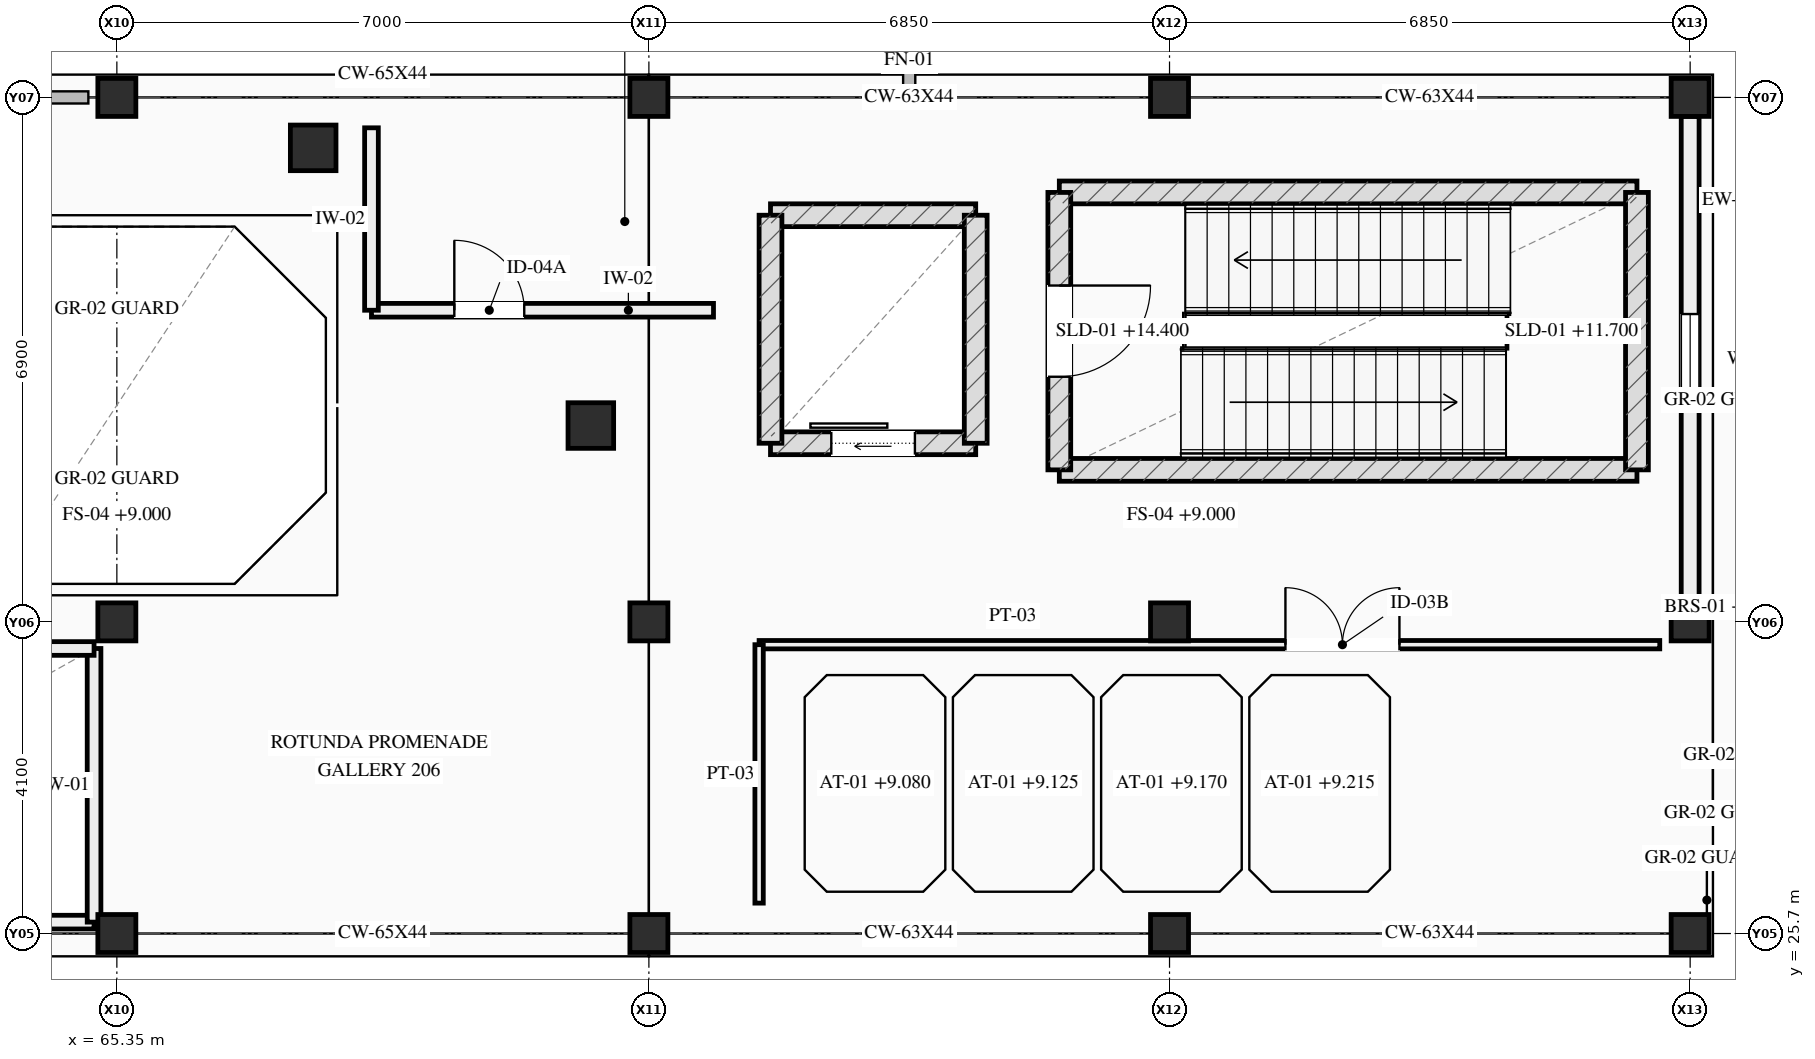
"""IFC4 building model, lengths in metres.
Left out: names, types, materials, properties, quantities, classifications, styles, units other than length and angle.
Written with IfcOpenShell. Run it as: python <this file> out.ifc"""

import sys

from ifc_helpers import new_model, si_unit, direction, frame, frame_2d, origin, origin_2d, place, context, subcontext, project, spatial, rectangle, circle, extrude, element, fill, save


model = new_model("IFC4")
c1 = context("Model", 3, precision=1e-05, world=origin(), true_north=direction((0.0, 1.0)))
c2 = subcontext(c1, "Body", "Model", "MODEL_VIEW")
j1 = project(units=[si_unit("LENGTHUNIT", "METRE"), si_unit("PLANEANGLEUNIT", "RADIAN")], contexts=[c1])
p1 = place(None, origin())
s1 = spatial("IfcSite", under=j1, at=p1, CompositionType="ELEMENT")
p2 = place(p1, origin())
s2 = spatial("IfcBuilding", under=s1, at=p2, CompositionType="ELEMENT")
p3 = place(p2, frame((0.0, 0.0, 9.0)))
s3 = spatial("IfcBuildingStorey", under=s2, at=p3, CompositionType="ELEMENT", Elevation=9.0)
for number, where, z_axis, x_axis in (
    (1, (65.35, 25.7, 0.0), (0.0, 0.0, 1.0), (1.0, 0.0, 0.0)),
    (2, (65.35, 29.8, 0.0), (0.0, 0.0, 1.0), (1.0, 0.0, 0.0)),
    (3, (65.35, 36.7, 0.0), (0.0, 0.0, 1.0), (1.0, 0.0, 0.0)),
    (4, (72.35, 25.7, 0.0), (0.0, 0.0, 1.0), (1.0, 0.0, 0.0)),
    (5, (72.35, 29.8, 0.0), (0.0, 0.0, 1.0), (1.0, 0.0, 0.0)),
    (6, (72.35, 36.7, 0.0), (0.0, 0.0, 1.0), (1.0, 0.0, 0.0)),
    (7, (79.2, 25.7, 0.0), (0.0, 0.0, 1.0), (1.0, 0.0, 0.0)),
    (8, (79.2, 29.8, 0.0), (0.0, 0.0, 1.0), (1.0, 0.0, 0.0)),
    (9, (79.2, 36.7, 0.0), (0.0, 0.0, 1.0), (1.0, 0.0, 0.0)),
    (10, (86.05, 25.7, 0.0), (0.0, 0.0, 1.0), (1.0, 0.0, 0.0)),
    (11, (86.05, 29.8, 0.0), (0.0, 0.0, 1.0), (1.0, 0.0, 0.0)),
    (12, (86.05, 36.7, 0.0), (0.0, 0.0, 1.0), (1.0, 0.0, 0.0)),
):
    element("IfcColumn", number, at=place(p3, frame(where, z_axis=z_axis, x_axis=x_axis)), inside=s3, PredefinedType="COLUMN", context=c2, shape_type="SweptSolid", body=[
        extrude(rectangle(XDim=0.5, YDim=0.5, at=origin_2d()), origin(), (0.0, 0.0, 1.0), 5.4),
    ])
for number, where, z_axis, x_axis in (
    (13, (71.586, 32.383, 0.0), (0.0, 0.0, 1.0), (1.0, 0.0, 0.0)),
    (14, (67.933, 36.036, 0.0), (0.0, 0.0, 1.0), (1.0, 0.0, 0.0)),
):
    element("IfcColumn", number, at=place(p3, frame(where, z_axis=z_axis, x_axis=x_axis)), inside=s3, PredefinedType="COLUMN", context=c2, shape_type="SweptSolid", body=[
        extrude(circle(Radius=0.3, at=origin_2d()), origin(), (0.0, 0.0, 1.0), 5.4),
    ])
p4 = place(p3, frame((86.05, 36.45, 0.0), z_axis=(0.0, 0.0, 1.0), x_axis=(0.0, -1.0, 0.0)))
e15 = element("IfcWall", 15, at=p4, inside=s3, PredefinedType="STANDARD", context=c2, shape_type="SweptSolid", body=[
    extrude(rectangle(XDim=6.4, YDim=0.235, at=frame_2d((3.2, 0.0))), origin(), (0.0, 0.0, 1.0), 4.14),
])
p5 = place(p4, frame((2.6, 0.0, 1.05)))
e16 = element("IfcOpeningElement", 16, at=p5, cuts=e15, PredefinedType="OPENING", context=c2, shape_type="SweptSolid", body=[
    extrude(rectangle(XDim=1.2, YDim=1.15, at=frame_2d((0.6, 0.575))), frame((0.0, 0.127, 0.0), z_axis=(0.0, -1.0, 0.0), x_axis=(1.0, 0.0, 0.0)), (0.0, 0.0, 1.0), 0.255),
])
for number, where, z_axis, x_axis in (
    (17, (77.75, 31.8, 0.0), (0.0, 0.0, 1.0), (1.0, 0.0, 0.0)),
    (18, (85.35, 35.45, 0.0), (0.0, 0.0, 1.0), (-1.0, 0.0, 0.0)),
):
    element("IfcWall", number, at=place(p3, frame(where, z_axis=z_axis, x_axis=x_axis)), inside=s3, PredefinedType="SHEAR", context=c2, shape_type="SweptSolid", body=[
        extrude(rectangle(XDim=7.6, YDim=0.3, at=frame_2d((3.8, 0.0))), origin(), (0.0, 0.0, 1.0), 5.175),
    ])
p6 = place(p3, frame((77.75, 35.45, 0.0), z_axis=(0.0, 0.0, 1.0), x_axis=(0.0, -1.0, 0.0)))
e19 = element("IfcWall", 19, at=p6, inside=s3, PredefinedType="SHEAR", context=c2, shape_type="SweptSolid", body=[
    extrude(rectangle(XDim=3.65, YDim=0.3, at=frame_2d((1.825, 0.0))), origin(), (0.0, 0.0, 1.0), 5.175),
])
p7 = place(p6, frame((1.225, 0.0, 0.0)))
e20 = element("IfcOpeningElement", 20, at=p7, cuts=e19, PredefinedType="OPENING", context=c2, shape_type="SweptSolid", body=[
    extrude(rectangle(XDim=1.2, YDim=2.2, at=frame_2d((0.6, 1.1))), frame((0.0, 0.16, 0.0), z_axis=(0.0, -1.0, 0.0), x_axis=(1.0, 0.0, 0.0)), (0.0, 0.0, 1.0), 0.32),
])
p8 = place(p3, frame((85.35, 31.8, 0.0), z_axis=(0.0, 0.0, 1.0), x_axis=(0.0, 1.0, 0.0)))
e21 = element("IfcWall", 21, at=p8, inside=s3, PredefinedType="SHEAR", context=c2, shape_type="SweptSolid", body=[
    extrude(rectangle(XDim=3.65, YDim=0.3, at=frame_2d((1.825, 0.0))), origin(), (0.0, 0.0, 1.0), 5.175),
])
p9 = place(p3, frame((73.95, 32.15, 0.0), z_axis=(0.0, 0.0, 1.0), x_axis=(1.0, 0.0, 0.0)))
e22 = element("IfcWall", 22, at=p9, inside=s3, PredefinedType="SHEAR", context=c2, shape_type="SweptSolid", body=[
    extrude(rectangle(XDim=2.7, YDim=0.3, at=frame_2d((1.35, 0.0))), origin(), (0.0, 0.0, 1.0), 5.175),
])
p10 = place(p9, frame((0.8, 0.0, 0.0)))
e23 = element("IfcOpeningElement", 23, at=p10, cuts=e22, PredefinedType="OPENING", context=c2, shape_type="SweptSolid", body=[
    extrude(rectangle(XDim=1.1, YDim=2.2, at=frame_2d((0.55, 1.1))), frame((0.0, 0.16, 0.0), z_axis=(0.0, -1.0, 0.0), x_axis=(1.0, 0.0, 0.0)), (0.0, 0.0, 1.0), 0.32),
])
p11 = place(p3, frame((73.95, 35.15, 0.0), z_axis=(0.0, 0.0, 1.0), x_axis=(1.0, 0.0, 0.0)))
e24 = element("IfcWall", 24, at=p11, inside=s3, PredefinedType="SHEAR", context=c2, shape_type="SweptSolid", body=[
    extrude(rectangle(XDim=2.7, YDim=0.3, at=frame_2d((1.35, 0.0))), origin(), (0.0, 0.0, 1.0), 5.175),
])
for number, where, z_axis, x_axis in (
    (25, (73.95, 32.15, 0.0), (0.0, 0.0, 1.0), (0.0, 1.0, 0.0)),
    (26, (76.65, 32.15, 0.0), (0.0, 0.0, 1.0), (0.0, 1.0, 0.0)),
):
    element("IfcWall", number, at=place(p3, frame(where, z_axis=z_axis, x_axis=x_axis)), inside=s3, PredefinedType="SHEAR", context=c2, shape_type="SweptSolid", body=[
        extrude(rectangle(XDim=3.0, YDim=0.3, at=frame_2d((1.5, 0.0))), origin(), (0.0, 0.0, 1.0), 5.175),
    ])
p12 = place(p3, frame((58.65, 25.85, 0.0), z_axis=(0.0, 0.0, 1.0), x_axis=(1.0, 0.0, 0.0)))
e27 = element("IfcWall", 27, at=p12, inside=s3, PredefinedType="PARAPET", context=c2, shape_type="SweptSolid", body=[
    extrude(rectangle(XDim=6.4, YDim=0.18, at=frame_2d((3.2, 0.0))), origin(), (0.0, 0.0, 1.0), 1.2),
])
p13 = place(p3, frame((65.05, 25.85, 0.0), z_axis=(0.0, 0.0, 1.0), x_axis=(0.0, 1.0, 0.0)))
e28 = element("IfcWall", 28, at=p13, inside=s3, PredefinedType="PARAPET", context=c2, shape_type="SweptSolid", body=[
    extrude(rectangle(XDim=3.6, YDim=0.18, at=frame_2d((1.8, 0.0))), origin(), (0.0, 0.0, 1.0), 1.2),
])
p14 = place(p3, frame((58.65, 29.45, 0.0), z_axis=(0.0, 0.0, 1.0), x_axis=(1.0, 0.0, 0.0)))
e29 = element("IfcWall", 29, at=p14, inside=s3, PredefinedType="PARAPET", context=c2, shape_type="SweptSolid", body=[
    extrude(rectangle(XDim=6.4, YDim=0.18, at=frame_2d((3.2, 0.0))), origin(), (0.0, 0.0, 1.0), 1.2),
])
p15 = place(p3, frame((73.8, 29.5, 0.0), z_axis=(0.0, 0.0, 1.0), x_axis=(1.0, 0.0, 0.0)))
e30 = element("IfcWall", 30, at=p15, inside=s3, PredefinedType="MOVABLE", context=c2, shape_type="SweptSolid", body=[
    extrude(rectangle(XDim=11.85, YDim=0.11, at=frame_2d((5.925, 0.0))), origin(), (0.0, 0.0, 1.0), 3.3),
])
p16 = place(p15, frame((6.925, 0.0, 0.0)))
e31 = element("IfcOpeningElement", 31, at=p16, cuts=e30, PredefinedType="OPENING", context=c2, shape_type="SweptSolid", body=[
    extrude(rectangle(XDim=1.5, YDim=2.2, at=frame_2d((0.75, 1.1))), frame((0.0, 0.065, 0.0), z_axis=(0.0, -1.0, 0.0), x_axis=(1.0, 0.0, 0.0)), (0.0, 0.0, 1.0), 0.13),
])
p17 = place(p3, frame((73.8, 26.1, 0.0), z_axis=(0.0, 0.0, 1.0), x_axis=(0.0, 1.0, 0.0)))
e32 = element("IfcWall", 32, at=p17, inside=s3, PredefinedType="MOVABLE", context=c2, shape_type="SweptSolid", body=[
    extrude(rectangle(XDim=3.4, YDim=0.11, at=frame_2d((1.7, 0.0))), origin(), (0.0, 0.0, 1.0), 3.3),
])
p18 = place(p3, frame((68.7, 33.9, 0.0), z_axis=(0.0, 0.0, 1.0), x_axis=(1.0, 0.0, 0.0)))
e33 = element("IfcWall", 33, at=p18, inside=s3, PredefinedType="PLUMBINGWALL", context=c2, shape_type="SweptSolid", body=[
    extrude(rectangle(XDim=4.5, YDim=0.18, at=frame_2d((2.25, 0.0))), origin(), (0.0, 0.0, 1.0), 3.3),
])
p19 = place(p18, frame((1.09, 0.0, 0.0)))
e34 = element("IfcOpeningElement", 34, at=p19, cuts=e33, PredefinedType="OPENING", context=c2, shape_type="SweptSolid", body=[
    extrude(rectangle(XDim=0.92, YDim=2.1, at=frame_2d((0.46, 1.05))), frame((0.0, 0.1, 0.0), z_axis=(0.0, -1.0, 0.0), x_axis=(1.0, 0.0, 0.0)), (0.0, 0.0, 1.0), 0.2),
])
p20 = place(p3, frame((68.7, 33.9, 0.0), z_axis=(0.0, 0.0, 1.0), x_axis=(0.0, 1.0, 0.0)))
e35 = element("IfcWall", 35, at=p20, inside=s3, PredefinedType="PLUMBINGWALL", context=c2, shape_type="SweptSolid", body=[
    extrude(rectangle(XDim=2.4, YDim=0.18, at=frame_2d((1.2, 0.0))), origin(), (0.0, 0.0, 1.0), 3.3),
])
p21 = place(p5, origin())
e36 = element("IfcWindow", 36, at=p21, inside=s3, PartitioningType="SINGLE_PANEL", PredefinedType="WINDOW", context=c2, shape_type="SweptSolid", body=[
    extrude(rectangle(XDim=1.2, YDim=1.15, at=frame_2d((0.6, 0.575))), frame((0.0, 0.03, 0.0), z_axis=(0.0, -1.0, 0.0), x_axis=(1.0, 0.0, 0.0)), (0.0, 0.0, 1.0), 0.06),
])
fill(e16, e36)
p22 = place(p7, origin())
e37 = element("IfcDoor", 37, at=p22, inside=s3, OperationType="SINGLE_SWING_LEFT", PredefinedType="DOOR", context=c2, shape_type="SweptSolid", body=[
    extrude(rectangle(XDim=1.2, YDim=2.2, at=frame_2d((0.6, 1.1))), frame((0.0, 0.025, 0.0), z_axis=(0.0, -1.0, 0.0), x_axis=(1.0, 0.0, 0.0)), (0.0, 0.0, 1.0), 0.05),
])
fill(e20, e37)
p23 = place(p10, origin())
e38 = element("IfcDoor", 38, at=p23, inside=s3, OperationType="SLIDING_TO_LEFT", PredefinedType="DOOR", context=c2, shape_type="SweptSolid", body=[
    extrude(rectangle(XDim=1.1, YDim=2.2, at=frame_2d((0.55, 1.1))), frame((0.0, 0.025, 0.0), z_axis=(0.0, -1.0, 0.0), x_axis=(1.0, 0.0, 0.0)), (0.0, 0.0, 1.0), 0.05),
])
fill(e23, e38)
p24 = place(p16, origin())
e39 = element("IfcDoor", 39, at=p24, inside=s3, OperationType="DOUBLE_DOOR_SINGLE_SWING", PredefinedType="DOOR", context=c2, shape_type="SweptSolid", body=[
    extrude(rectangle(XDim=1.5, YDim=2.2, at=frame_2d((0.75, 1.1))), frame((0.0, 0.025, 0.0), z_axis=(0.0, -1.0, 0.0), x_axis=(1.0, 0.0, 0.0)), (0.0, 0.0, 1.0), 0.05),
])
fill(e31, e39)
p25 = place(p19, origin())
e40 = element("IfcDoor", 40, at=p25, inside=s3, OperationType="SINGLE_SWING_LEFT", PredefinedType="DOOR", context=c2, shape_type="SweptSolid", body=[
    extrude(rectangle(XDim=0.92, YDim=2.1, at=frame_2d((0.46, 1.05))), frame((0.0, 0.025, 0.0), z_axis=(0.0, -1.0, 0.0), x_axis=(1.0, 0.0, 0.0)), (0.0, 0.0, 1.0), 0.05),
])
fill(e34, e40)
save(model, sys.argv[1])
